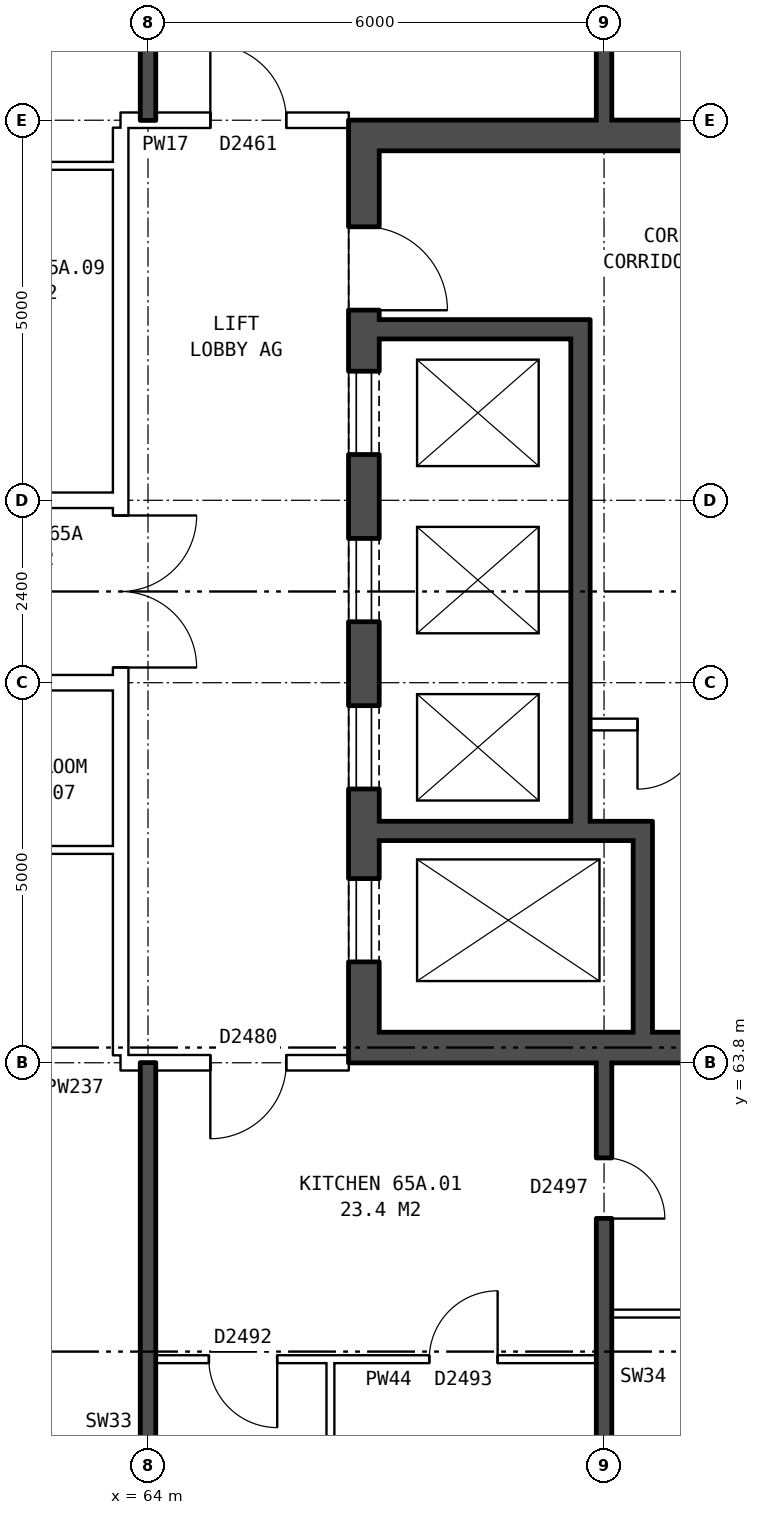
"""IFC4 building model, lengths in metres.
Left out: names, types, materials, properties, quantities, classifications, styles, units other than length and angle.
Written with IfcOpenShell. Run it as: python <this file> out.ifc"""

import sys

from ifc_helpers import new_model, si_unit, direction, frame, frame_2d, origin, place, context, subcontext, project, spatial, rectangle, extrude, element, fill, save


model = new_model("IFC4")
c1 = context("Model", 3, precision=1e-05, world=origin(), true_north=direction((0.0, 1.0)))
c2 = subcontext(c1, "Body", "Model", "MODEL_VIEW")
j1 = project(units=[si_unit("LENGTHUNIT", "METRE"), si_unit("PLANEANGLEUNIT", "RADIAN")], contexts=[c1])
p1 = place(None, origin())
s1 = spatial("IfcSite", under=j1, at=p1, CompositionType="ELEMENT")
p2 = place(p1, origin())
s2 = spatial("IfcBuilding", under=s1, at=p2, CompositionType="ELEMENT")
p3 = place(p2, frame((0.0, 0.0, 230.7)))
s3 = spatial("IfcBuildingStorey", under=s2, at=p3, CompositionType="ELEMENT", Elevation=230.7)
p4 = place(p3, frame((66.84, 63.8, 0.0), z_axis=(0.0, 0.0, 1.0), x_axis=(0.0, 1.0, 0.0)))
e1 = element("IfcWall", 1, at=p4, inside=s3, PredefinedType="SHEAR", context=c2, shape_type="SweptSolid", body=[
    extrude(rectangle(XDim=12.4, YDim=0.4, at=frame_2d((6.2, 0.0))), origin(), (0.0, 0.0, 1.0), 2.85),
])
p5 = place(p4, frame((1.325, 0.0, 0.0)))
e2 = element("IfcOpeningElement", 2, at=p5, cuts=e1, PredefinedType="OPENING", context=c2, shape_type="SweptSolid", body=[
    extrude(rectangle(XDim=1.1, YDim=2.1, at=frame_2d((0.55, 1.05))), frame((0.0, 0.21, 0.0), z_axis=(0.0, -1.0, 0.0), x_axis=(1.0, 0.0, 0.0)), (0.0, 0.0, 1.0), 0.42),
])
p6 = place(p4, frame((3.6, 0.0, 0.0)))
e3 = element("IfcOpeningElement", 3, at=p6, cuts=e1, PredefinedType="OPENING", context=c2, shape_type="SweptSolid", body=[
    extrude(rectangle(XDim=1.1, YDim=2.1, at=frame_2d((0.55, 1.05))), frame((0.0, 0.21, 0.0), z_axis=(0.0, -1.0, 0.0), x_axis=(1.0, 0.0, 0.0)), (0.0, 0.0, 1.0), 0.42),
])
p7 = place(p4, frame((5.8, 0.0, 0.0)))
e4 = element("IfcOpeningElement", 4, at=p7, cuts=e1, PredefinedType="OPENING", context=c2, shape_type="SweptSolid", body=[
    extrude(rectangle(XDim=1.1, YDim=2.1, at=frame_2d((0.55, 1.05))), frame((0.0, 0.21, 0.0), z_axis=(0.0, -1.0, 0.0), x_axis=(1.0, 0.0, 0.0)), (0.0, 0.0, 1.0), 0.42),
])
p8 = place(p4, frame((8.0, 0.0, 0.0)))
e5 = element("IfcOpeningElement", 5, at=p8, cuts=e1, PredefinedType="OPENING", context=c2, shape_type="SweptSolid", body=[
    extrude(rectangle(XDim=1.1, YDim=2.1, at=frame_2d((0.55, 1.05))), frame((0.0, 0.21, 0.0), z_axis=(0.0, -1.0, 0.0), x_axis=(1.0, 0.0, 0.0)), (0.0, 0.0, 1.0), 0.42),
])
p9 = place(p4, frame((9.9, 0.0, 0.0)))
e6 = element("IfcOpeningElement", 6, at=p9, cuts=e1, PredefinedType="OPENING", context=c2, shape_type="SweptSolid", body=[
    extrude(rectangle(XDim=1.1, YDim=2.1, at=frame_2d((0.55, 1.05))), frame((0.0, 0.21, 0.0), z_axis=(0.0, -1.0, 0.0), x_axis=(1.0, 0.0, 0.0)), (0.0, 0.0, 1.0), 0.42),
])
for number, where, z_axis, x_axis in (
    (7, (67.04, 64.0, 0.0), (0.0, 0.0, 1.0), (1.0, 0.0, 0.0)),
    (8, (67.04, 76.0, 0.0), (0.0, 0.0, 1.0), (1.0, 0.0, 0.0)),
):
    element("IfcWall", number, at=place(p3, frame(where, z_axis=z_axis, x_axis=x_axis)), inside=s3, PredefinedType="SHEAR", context=c2, shape_type="SweptSolid", body=[
        extrude(rectangle(XDim=8.2, YDim=0.4, at=frame_2d((4.1, 0.0))), origin(), (0.0, 0.0, 1.0), 2.85),
    ])
p10 = place(p3, frame((67.04, 66.85, 0.0), z_axis=(0.0, 0.0, 1.0), x_axis=(1.0, 0.0, 0.0)))
e9 = element("IfcWall", 9, at=p10, inside=s3, PredefinedType="SHEAR", context=c2, shape_type="SweptSolid", body=[
    extrude(rectangle(XDim=3.595, YDim=0.25, at=frame_2d((1.797, 0.0))), origin(), (0.0, 0.0, 1.0), 2.85),
])
p11 = place(p3, frame((69.815, 68.25, 0.0), z_axis=(0.0, 0.0, 1.0), x_axis=(1.0, 0.0, 0.0)))
e10 = element("IfcWall", 10, at=p11, inside=s3, PredefinedType="PARTITIONING", context=c2, shape_type="SweptSolid", body=[
    extrude(rectangle(XDim=2.1, YDim=0.15, at=frame_2d((1.05, 0.0))), origin(), (0.0, 0.0, 1.0), 2.85),
])
p12 = place(p11, frame((0.625, 0.0, 0.0)))
e11 = element("IfcOpeningElement", 11, at=p12, cuts=e10, PredefinedType="OPENING", context=c2, shape_type="SweptSolid", body=[
    extrude(rectangle(XDim=0.85, YDim=2.1, at=frame_2d((0.425, 1.05))), frame((0.0, 0.085, 0.0), z_axis=(0.0, -1.0, 0.0), x_axis=(1.0, 0.0, 0.0)), (0.0, 0.0, 1.0), 0.17),
])
p13 = place(p3, frame((67.04, 73.45, 0.0), z_axis=(0.0, 0.0, 1.0), x_axis=(1.0, 0.0, 0.0)))
e12 = element("IfcWall", 12, at=p13, inside=s3, PredefinedType="SHEAR", context=c2, shape_type="SweptSolid", body=[
    extrude(rectangle(XDim=2.525, YDim=0.25, at=frame_2d((1.262, 0.0))), origin(), (0.0, 0.0, 1.0), 2.85),
])
p14 = place(p3, frame((69.69, 66.975, 0.0), z_axis=(0.0, 0.0, 1.0), x_axis=(0.0, 1.0, 0.0)))
e13 = element("IfcWall", 13, at=p14, inside=s3, PredefinedType="SHEAR", context=c2, shape_type="SweptSolid", body=[
    extrude(rectangle(XDim=6.6, YDim=0.25, at=frame_2d((3.3, 0.0))), origin(), (0.0, 0.0, 1.0), 2.85),
])
p15 = place(p3, frame((70.51, 64.2, 0.0), z_axis=(0.0, 0.0, 1.0), x_axis=(0.0, 1.0, 0.0)))
e14 = element("IfcWall", 14, at=p15, inside=s3, PredefinedType="SHEAR", context=c2, shape_type="SweptSolid", body=[
    extrude(rectangle(XDim=2.525, YDim=0.25, at=frame_2d((1.263, 0.0))), origin(), (0.0, 0.0, 1.0), 2.85),
])
p16 = place(p3, frame((63.64, 63.9, 0.0), z_axis=(0.0, 0.0, 1.0), x_axis=(0.0, 1.0, 0.0)))
e15 = element("IfcWall", 15, at=p16, inside=s3, PredefinedType="PARTITIONING", context=c2, shape_type="SweptSolid", body=[
    extrude(rectangle(XDim=12.2, YDim=0.2, at=frame_2d((6.1, 0.0))), origin(), (0.0, 0.0, 1.0), 2.85),
])
p17 = place(p16, frame((5.1, 0.0, 0.0)))
e16 = element("IfcOpeningElement", 16, at=p17, cuts=e15, PredefinedType="OPENING", context=c2, shape_type="SweptSolid", body=[
    extrude(rectangle(XDim=2.0, YDim=2.1, at=frame_2d((1.0, 1.05))), frame((0.0, 0.11, 0.0), z_axis=(0.0, -1.0, 0.0), x_axis=(1.0, 0.0, 0.0)), (0.0, 0.0, 1.0), 0.22),
])
p18 = place(p3, frame((64.1, 59.9, 0.0), z_axis=(0.0, 0.0, 1.0), x_axis=(1.0, 0.0, 0.0)))
e17 = element("IfcWall", 17, at=p18, inside=s3, PredefinedType="PARTITIONING", context=c2, shape_type="SweptSolid", body=[
    extrude(rectangle(XDim=5.8, YDim=0.1, at=frame_2d((2.9, 0.0))), origin(), (0.0, 0.0, 1.0), 2.85),
])
p19 = place(p18, frame((3.6, 0.0, 0.0)))
e18 = element("IfcOpeningElement", 18, at=p19, cuts=e17, PredefinedType="OPENING", context=c2, shape_type="SweptSolid", body=[
    extrude(rectangle(XDim=0.9, YDim=2.1, at=frame_2d((0.45, 1.05))), frame((0.0, 0.06, 0.0), z_axis=(0.0, -1.0, 0.0), x_axis=(1.0, 0.0, 0.0)), (0.0, 0.0, 1.0), 0.12),
])
p20 = place(p18, frame((0.7, 0.0, 0.0)))
e19 = element("IfcOpeningElement", 19, at=p20, cuts=e17, PredefinedType="OPENING", context=c2, shape_type="SweptSolid", body=[
    extrude(rectangle(XDim=0.9, YDim=2.1, at=frame_2d((0.45, 1.05))), frame((0.0, 0.06, 0.0), z_axis=(0.0, -1.0, 0.0), x_axis=(1.0, 0.0, 0.0)), (0.0, 0.0, 1.0), 0.12),
])
p21 = place(p3, frame((70.1, 60.5, 0.0), z_axis=(0.0, 0.0, 1.0), x_axis=(1.0, 0.0, 0.0)))
e20 = element("IfcWall", 20, at=p21, inside=s3, PredefinedType="PARTITIONING", context=c2, shape_type="SweptSolid", body=[
    extrude(rectangle(XDim=5.8, YDim=0.1, at=frame_2d((2.9, 0.0))), origin(), (0.0, 0.0, 1.0), 2.85),
])
p22 = place(p3, frame((63.64, 63.8, 0.0), z_axis=(0.0, 0.0, 1.0), x_axis=(1.0, 0.0, 0.0)))
e21 = element("IfcWall", 21, at=p22, inside=s3, PredefinedType="PARTITIONING", context=c2, shape_type="SweptSolid", body=[
    extrude(rectangle(XDim=3.0, YDim=0.2, at=frame_2d((1.5, 0.0))), origin(), (0.0, 0.0, 1.0), 2.85),
])
p23 = place(p22, frame((1.18, 0.0, 0.0)))
e22 = element("IfcOpeningElement", 22, at=p23, cuts=e21, PredefinedType="OPENING", context=c2, shape_type="SweptSolid", body=[
    extrude(rectangle(XDim=1.0, YDim=2.1, at=frame_2d((0.5, 1.05))), frame((0.0, 0.11, 0.0), z_axis=(0.0, -1.0, 0.0), x_axis=(1.0, 0.0, 0.0)), (0.0, 0.0, 1.0), 0.22),
])
p24 = place(p3, frame((61.0, 66.6, 0.0), z_axis=(0.0, 0.0, 1.0), x_axis=(1.0, 0.0, 0.0)))
e23 = element("IfcWall", 23, at=p24, inside=s3, PredefinedType="PARTITIONING", context=c2, shape_type="SweptSolid", body=[
    extrude(rectangle(XDim=2.64, YDim=0.1, at=frame_2d((1.32, 0.0))), origin(), (0.0, 0.0, 1.0), 2.85),
])
p25 = place(p3, frame((44.36, 68.8, 0.0), z_axis=(0.0, 0.0, 1.0), x_axis=(1.0, 0.0, 0.0)))
e24 = element("IfcWall", 24, at=p25, inside=s3, PredefinedType="PARTITIONING", context=c2, shape_type="SweptSolid", body=[
    extrude(rectangle(XDim=19.28, YDim=0.2, at=frame_2d((9.64, 0.0))), origin(), (0.0, 0.0, 1.0), 2.85),
])
p26 = place(p25, frame((14.64, 0.0, 0.0)))
e25 = element("IfcOpeningElement", 25, at=p26, cuts=e24, PredefinedType="OPENING", context=c2, shape_type="SweptSolid", body=[
    extrude(rectangle(XDim=1.0, YDim=2.1, at=frame_2d((0.5, 1.05))), frame((0.0, 0.11, 0.0), z_axis=(0.0, -1.0, 0.0), x_axis=(1.0, 0.0, 0.0)), (0.0, 0.0, 1.0), 0.22),
])
p27 = place(p25, frame((5.64, 0.0, 0.0)))
e26 = element("IfcOpeningElement", 26, at=p27, cuts=e24, PredefinedType="OPENING", context=c2, shape_type="SweptSolid", body=[
    extrude(rectangle(XDim=1.0, YDim=2.1, at=frame_2d((0.5, 1.05))), frame((0.0, 0.11, 0.0), z_axis=(0.0, -1.0, 0.0), x_axis=(1.0, 0.0, 0.0)), (0.0, 0.0, 1.0), 0.22),
])
p28 = place(p3, frame((44.36, 71.2, 0.0), z_axis=(0.0, 0.0, 1.0), x_axis=(1.0, 0.0, 0.0)))
e27 = element("IfcWall", 27, at=p28, inside=s3, PredefinedType="PARTITIONING", context=c2, shape_type="SweptSolid", body=[
    extrude(rectangle(XDim=19.28, YDim=0.2, at=frame_2d((9.64, 0.0))), origin(), (0.0, 0.0, 1.0), 2.85),
])
p29 = place(p28, frame((14.64, 0.0, 0.0)))
e28 = element("IfcOpeningElement", 28, at=p29, cuts=e27, PredefinedType="OPENING", context=c2, shape_type="SweptSolid", body=[
    extrude(rectangle(XDim=1.0, YDim=2.1, at=frame_2d((0.5, 1.05))), frame((0.0, 0.11, 0.0), z_axis=(0.0, -1.0, 0.0), x_axis=(1.0, 0.0, 0.0)), (0.0, 0.0, 1.0), 0.22),
])
p30 = place(p28, frame((11.64, 0.0, 0.0)))
e29 = element("IfcOpeningElement", 29, at=p30, cuts=e27, PredefinedType="OPENING", context=c2, shape_type="SweptSolid", body=[
    extrude(rectangle(XDim=1.0, YDim=2.1, at=frame_2d((0.5, 1.05))), frame((0.0, 0.11, 0.0), z_axis=(0.0, -1.0, 0.0), x_axis=(1.0, 0.0, 0.0)), (0.0, 0.0, 1.0), 0.22),
])
p31 = place(p28, frame((2.64, 0.0, 0.0)))
e30 = element("IfcOpeningElement", 30, at=p31, cuts=e27, PredefinedType="OPENING", context=c2, shape_type="SweptSolid", body=[
    extrude(rectangle(XDim=1.0, YDim=2.1, at=frame_2d((0.5, 1.05))), frame((0.0, 0.11, 0.0), z_axis=(0.0, -1.0, 0.0), x_axis=(1.0, 0.0, 0.0)), (0.0, 0.0, 1.0), 0.22),
])
p32 = place(p3, frame((61.0, 75.6, 0.0), z_axis=(0.0, 0.0, 1.0), x_axis=(1.0, 0.0, 0.0)))
e31 = element("IfcWall", 31, at=p32, inside=s3, PredefinedType="PARTITIONING", context=c2, shape_type="SweptSolid", body=[
    extrude(rectangle(XDim=2.64, YDim=0.1, at=frame_2d((1.32, 0.0))), origin(), (0.0, 0.0, 1.0), 2.85),
])
p33 = place(p3, frame((63.64, 76.2, 0.0), z_axis=(0.0, 0.0, 1.0), x_axis=(1.0, 0.0, 0.0)))
e32 = element("IfcWall", 32, at=p33, inside=s3, PredefinedType="PARTITIONING", context=c2, shape_type="SweptSolid", body=[
    extrude(rectangle(XDim=3.0, YDim=0.2, at=frame_2d((1.5, 0.0))), origin(), (0.0, 0.0, 1.0), 2.85),
])
p34 = place(p33, frame((1.18, 0.0, 0.0)))
e33 = element("IfcOpeningElement", 33, at=p34, cuts=e32, PredefinedType="OPENING", context=c2, shape_type="SweptSolid", body=[
    extrude(rectangle(XDim=1.0, YDim=2.1, at=frame_2d((0.5, 1.05))), frame((0.0, 0.11, 0.0), z_axis=(0.0, -1.0, 0.0), x_axis=(1.0, 0.0, 0.0)), (0.0, 0.0, 1.0), 0.22),
])
for number, where, z_axis, x_axis in (
    (34, (64.0, 54.36, 0.0), (0.0, 0.0, 1.0), (0.0, 1.0, 0.0)),
    (35, (64.0, 76.2, 0.0), (0.0, 0.0, 1.0), (0.0, 1.0, 0.0)),
):
    element("IfcWall", number, at=place(p3, frame(where, z_axis=z_axis, x_axis=x_axis)), inside=s3, PredefinedType="SOLIDWALL", context=c2, shape_type="SweptSolid", body=[
        extrude(rectangle(XDim=9.44, YDim=0.2, at=frame_2d((4.72, 0.0))), origin(), (0.0, 0.0, 1.0), 2.85),
    ])
p35 = place(p3, frame((66.4, 57.45, 0.0), z_axis=(0.0, 0.0, 1.0), x_axis=(0.0, 1.0, 0.0)))
e36 = element("IfcWall", 36, at=p35, inside=s3, PredefinedType="PARTITIONING", context=c2, shape_type="SweptSolid", body=[
    extrude(rectangle(XDim=2.4, YDim=0.1, at=frame_2d((1.2, 0.0))), origin(), (0.0, 0.0, 1.0), 2.85),
])
p36 = place(p3, frame((70.0, 54.36, 0.0), z_axis=(0.0, 0.0, 1.0), x_axis=(0.0, 1.0, 0.0)))
e37 = element("IfcWall", 37, at=p36, inside=s3, PredefinedType="SOLIDWALL", context=c2, shape_type="SweptSolid", body=[
    extrude(rectangle(XDim=9.44, YDim=0.2, at=frame_2d((4.72, 0.0))), origin(), (0.0, 0.0, 1.0), 2.85),
])
p37 = place(p36, frame((2.32, 0.0, 0.0)))
e38 = element("IfcOpeningElement", 38, at=p37, cuts=e37, PredefinedType="OPENING", context=c2, shape_type="SweptSolid", body=[
    extrude(rectangle(XDim=0.9, YDim=2.1, at=frame_2d((0.45, 1.05))), frame((0.0, 0.11, 0.0), z_axis=(0.0, -1.0, 0.0), x_axis=(1.0, 0.0, 0.0)), (0.0, 0.0, 1.0), 0.22),
])
p38 = place(p36, frame((7.39, 0.0, 0.0)))
e39 = element("IfcOpeningElement", 39, at=p38, cuts=e37, PredefinedType="OPENING", context=c2, shape_type="SweptSolid", body=[
    extrude(rectangle(XDim=0.8, YDim=2.1, at=frame_2d((0.4, 1.05))), frame((0.0, 0.11, 0.0), z_axis=(0.0, -1.0, 0.0), x_axis=(1.0, 0.0, 0.0)), (0.0, 0.0, 1.0), 0.22),
])
p39 = place(p3, frame((70.0, 76.2, 0.0), z_axis=(0.0, 0.0, 1.0), x_axis=(0.0, 1.0, 0.0)))
e40 = element("IfcWall", 40, at=p39, inside=s3, PredefinedType="SOLIDWALL", context=c2, shape_type="SweptSolid", body=[
    extrude(rectangle(XDim=9.44, YDim=0.2, at=frame_2d((4.72, 0.0))), origin(), (0.0, 0.0, 1.0), 2.85),
])
p40 = place(p39, frame((5.92, 0.0, 0.0)))
e41 = element("IfcOpeningElement", 41, at=p40, cuts=e40, PredefinedType="OPENING", context=c2, shape_type="SweptSolid", body=[
    extrude(rectangle(XDim=0.9, YDim=2.1, at=frame_2d((0.45, 1.05))), frame((0.0, 0.11, 0.0), z_axis=(0.0, -1.0, 0.0), x_axis=(1.0, 0.0, 0.0)), (0.0, 0.0, 1.0), 0.22),
])
p41 = place(p39, frame((1.25, 0.0, 0.0)))
e42 = element("IfcOpeningElement", 42, at=p41, cuts=e40, PredefinedType="OPENING", context=c2, shape_type="SweptSolid", body=[
    extrude(rectangle(XDim=0.8, YDim=2.1, at=frame_2d((0.4, 1.05))), frame((0.0, 0.11, 0.0), z_axis=(0.0, -1.0, 0.0), x_axis=(1.0, 0.0, 0.0)), (0.0, 0.0, 1.0), 0.22),
])
p42 = place(p5, origin())
e43 = element("IfcDoor", 43, at=p42, inside=s3, OperationType="DOUBLE_DOOR_SLIDING", PredefinedType="DOOR", context=c2, shape_type="SweptSolid", body=[
    extrude(rectangle(XDim=1.1, YDim=2.1, at=frame_2d((0.55, 1.05))), frame((0.0, -0.135, 0.0), z_axis=(0.0, -1.0, 0.0), x_axis=(1.0, 0.0, 0.0)), (0.0, 0.0, 1.0), 0.05),
])
fill(e2, e43)
p43 = place(p6, origin())
e44 = element("IfcDoor", 44, at=p43, inside=s3, OperationType="DOUBLE_DOOR_SLIDING", PredefinedType="DOOR", context=c2, shape_type="SweptSolid", body=[
    extrude(rectangle(XDim=1.1, YDim=2.1, at=frame_2d((0.55, 1.05))), frame((0.0, -0.135, 0.0), z_axis=(0.0, -1.0, 0.0), x_axis=(1.0, 0.0, 0.0)), (0.0, 0.0, 1.0), 0.05),
])
fill(e3, e44)
p44 = place(p7, origin())
e45 = element("IfcDoor", 45, at=p44, inside=s3, OperationType="DOUBLE_DOOR_SLIDING", PredefinedType="DOOR", context=c2, shape_type="SweptSolid", body=[
    extrude(rectangle(XDim=1.1, YDim=2.1, at=frame_2d((0.55, 1.05))), frame((0.0, -0.135, 0.0), z_axis=(0.0, -1.0, 0.0), x_axis=(1.0, 0.0, 0.0)), (0.0, 0.0, 1.0), 0.05),
])
fill(e4, e45)
p45 = place(p8, origin())
e46 = element("IfcDoor", 46, at=p45, inside=s3, OperationType="DOUBLE_DOOR_SLIDING", PredefinedType="DOOR", context=c2, shape_type="SweptSolid", body=[
    extrude(rectangle(XDim=1.1, YDim=2.1, at=frame_2d((0.55, 1.05))), frame((0.0, -0.135, 0.0), z_axis=(0.0, -1.0, 0.0), x_axis=(1.0, 0.0, 0.0)), (0.0, 0.0, 1.0), 0.05),
])
fill(e5, e46)
p46 = place(p9, frame((1.1, 0.0, 0.0), z_axis=(0.0, 0.0, 1.0), x_axis=(-1.0, 0.0, 0.0)))
e47 = element("IfcDoor", 47, at=p46, inside=s3, OperationType="SINGLE_SWING_RIGHT", PredefinedType="DOOR", context=c2, shape_type="SweptSolid", body=[
    extrude(rectangle(XDim=1.1, YDim=2.1, at=frame_2d((0.55, 1.05))), frame((0.0, 0.185, 0.0), z_axis=(0.0, -1.0, 0.0), x_axis=(1.0, 0.0, 0.0)), (0.0, 0.0, 1.0), 0.05),
])
fill(e6, e47)
p47 = place(p12, frame((0.85, 0.0, 0.0), z_axis=(0.0, 0.0, 1.0), x_axis=(-1.0, 0.0, 0.0)))
e48 = element("IfcDoor", 48, at=p47, inside=s3, OperationType="SINGLE_SWING_RIGHT", PredefinedType="DOOR", context=c2, shape_type="SweptSolid", body=[
    extrude(rectangle(XDim=0.85, YDim=2.1, at=frame_2d((0.425, 1.05))), frame((0.0, 0.025, 0.0), z_axis=(0.0, -1.0, 0.0), x_axis=(1.0, 0.0, 0.0)), (0.0, 0.0, 1.0), 0.05),
])
fill(e11, e48)
p48 = place(p17, frame((2.0, 0.0, 0.0), z_axis=(0.0, 0.0, 1.0), x_axis=(-1.0, 0.0, 0.0)))
e49 = element("IfcDoor", 49, at=p48, inside=s3, OperationType="DOUBLE_DOOR_SINGLE_SWING", PredefinedType="DOOR", context=c2, shape_type="SweptSolid", body=[
    extrude(rectangle(XDim=2.0, YDim=2.1, at=frame_2d((1.0, 1.05))), frame((0.0, 0.025, 0.0), z_axis=(0.0, -1.0, 0.0), x_axis=(1.0, 0.0, 0.0)), (0.0, 0.0, 1.0), 0.05),
])
fill(e16, e49)
p49 = place(p23, frame((1.0, 0.0, 0.0), z_axis=(0.0, 0.0, 1.0), x_axis=(-1.0, 0.0, 0.0)))
e50 = element("IfcDoor", 50, at=p49, inside=s3, OperationType="SINGLE_SWING_RIGHT", PredefinedType="DOOR", context=c2, shape_type="SweptSolid", body=[
    extrude(rectangle(XDim=1.0, YDim=2.1, at=frame_2d((0.5, 1.05))), frame((0.0, 0.025, 0.0), z_axis=(0.0, -1.0, 0.0), x_axis=(1.0, 0.0, 0.0)), (0.0, 0.0, 1.0), 0.05),
])
fill(e22, e50)
p50 = place(p19, origin())
e51 = element("IfcDoor", 51, at=p50, inside=s3, OperationType="SINGLE_SWING_RIGHT", PredefinedType="DOOR", context=c2, shape_type="SweptSolid", body=[
    extrude(rectangle(XDim=0.9, YDim=2.1, at=frame_2d((0.45, 1.05))), frame((0.0, 0.025, 0.0), z_axis=(0.0, -1.0, 0.0), x_axis=(1.0, 0.0, 0.0)), (0.0, 0.0, 1.0), 0.05),
])
fill(e18, e51)
p51 = place(p38, frame((0.8, 0.0, 0.0), z_axis=(0.0, 0.0, 1.0), x_axis=(-1.0, 0.0, 0.0)))
e52 = element("IfcDoor", 52, at=p51, inside=s3, OperationType="SINGLE_SWING_RIGHT", PredefinedType="DOOR", context=c2, shape_type="SweptSolid", body=[
    extrude(rectangle(XDim=0.8, YDim=2.1, at=frame_2d((0.4, 1.05))), frame((0.0, 0.025, 0.0), z_axis=(0.0, -1.0, 0.0), x_axis=(1.0, 0.0, 0.0)), (0.0, 0.0, 1.0), 0.05),
])
fill(e39, e52)
p52 = place(p20, frame((0.9, 0.0, 0.0), z_axis=(0.0, 0.0, 1.0), x_axis=(-1.0, 0.0, 0.0)))
e53 = element("IfcDoor", 53, at=p52, inside=s3, OperationType="SINGLE_SWING_LEFT", PredefinedType="DOOR", context=c2, shape_type="SweptSolid", body=[
    extrude(rectangle(XDim=0.9, YDim=2.1, at=frame_2d((0.45, 1.05))), frame((0.0, 0.025, 0.0), z_axis=(0.0, -1.0, 0.0), x_axis=(1.0, 0.0, 0.0)), (0.0, 0.0, 1.0), 0.05),
])
fill(e19, e53)
p53 = place(p34, origin())
e54 = element("IfcDoor", 54, at=p53, inside=s3, OperationType="SINGLE_SWING_LEFT", PredefinedType="DOOR", context=c2, shape_type="SweptSolid", body=[
    extrude(rectangle(XDim=1.0, YDim=2.1, at=frame_2d((0.5, 1.05))), frame((0.0, 0.025, 0.0), z_axis=(0.0, -1.0, 0.0), x_axis=(1.0, 0.0, 0.0)), (0.0, 0.0, 1.0), 0.05),
])
fill(e33, e54)
save(model, sys.argv[1])
